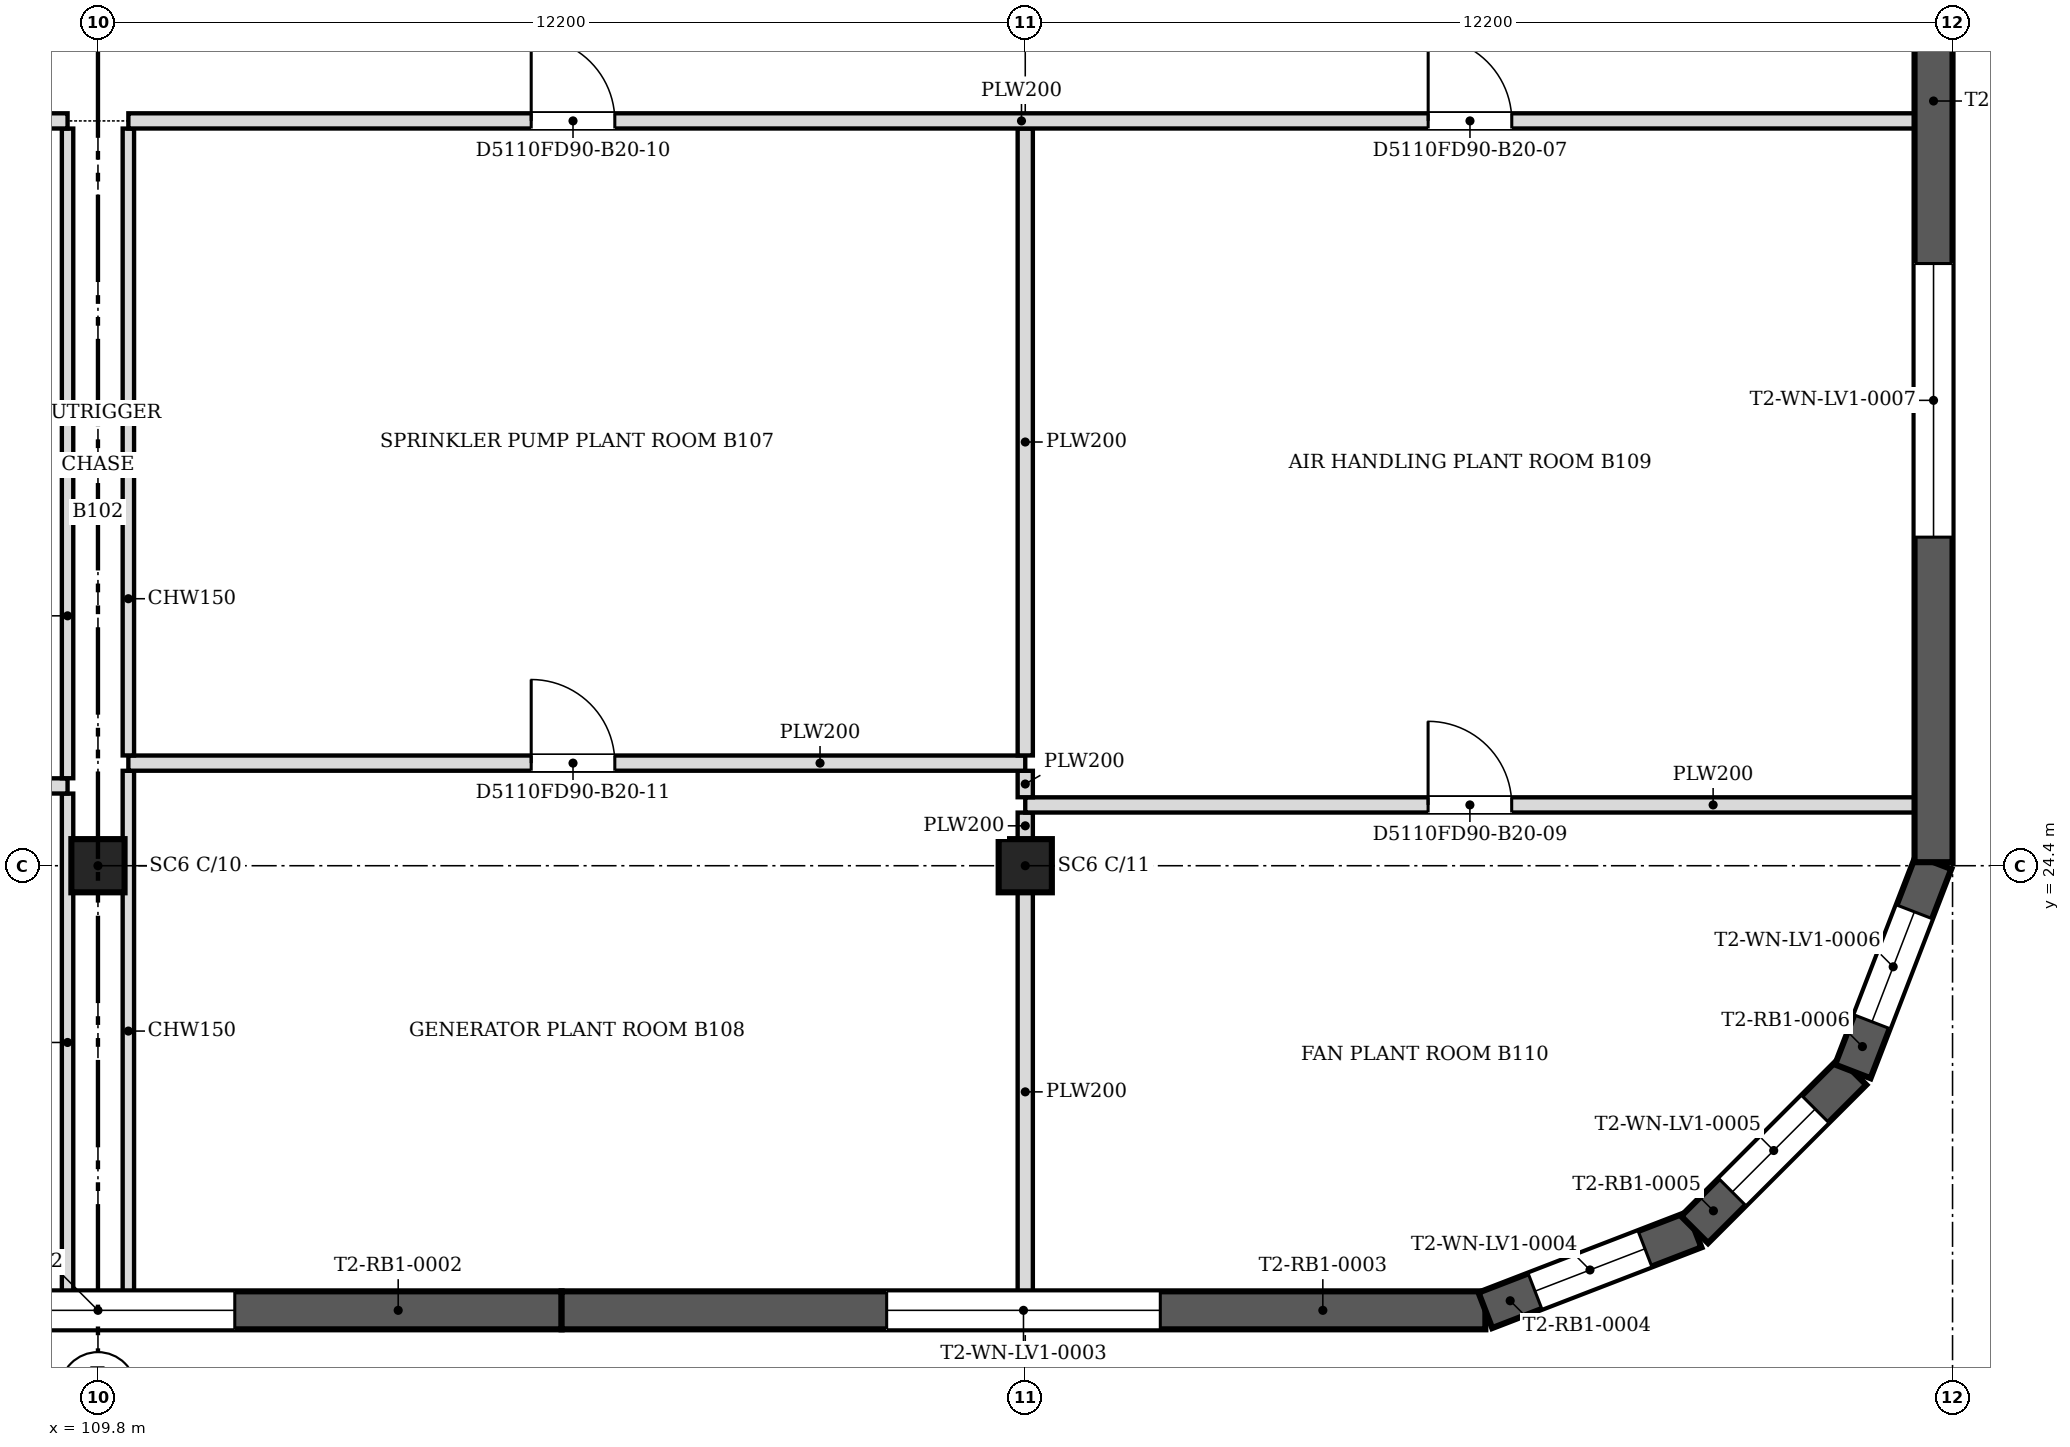
"""IFC4 building model, lengths in metres.
Left out: names, types, materials, properties, quantities, classifications, styles, units other than length and angle.
Written with IfcOpenShell. Run it as: python <this file> out.ifc"""

import sys

from ifc_helpers import new_model, si_unit, direction, frame, frame_2d, origin, origin_2d, place, context, subcontext, project, spatial, polyline, rectangle, outline, extrude, faceted_brep, source, transform, mapped, element, fill, save


model = new_model("IFC4")
c1 = context("Model", 3, precision=1e-05, world=origin(), true_north=direction((0.0, 1.0)))
c2 = subcontext(c1, "Body", "Model", "MODEL_VIEW")
j1 = project(units=[si_unit("LENGTHUNIT", "METRE"), si_unit("PLANEANGLEUNIT", "RADIAN")], contexts=[c1])
p1 = place(None, origin())
s1 = spatial("IfcSite", under=j1, at=p1, CompositionType="ELEMENT")
p2 = place(p1, origin())
s2 = spatial("IfcBuilding", under=s1, at=p2, CompositionType="ELEMENT")
p3 = place(p2, frame((0.0, 0.0, 63.8)))
s3 = spatial("IfcBuildingStorey", under=s2, at=p3, CompositionType="ELEMENT", Elevation=63.8)
for number, where, z_axis, x_axis in (
    (1, (109.8, 24.4, 0.0), (0.0, 0.0, 1.0), (1.0, 0.0, 0.0)),
    (2, (122.0, 24.4, 0.0), (0.0, 0.0, 1.0), (1.0, 0.0, 0.0)),
):
    element("IfcColumn", number, at=place(p3, frame(where, z_axis=z_axis, x_axis=x_axis)), inside=s3, PredefinedType="COLUMN", context=c2, shape_type="SweptSolid", body=[
        extrude(rectangle(XDim=0.7, YDim=0.7, at=origin_2d()), origin(), (0.0, 0.0, 1.0), 4.6),
    ])
m1 = source(origin(), c2, "Body", "SweptSolid", [
    extrude(outline(polyline([(0.0, 0.0), (12.2, 0.0), (12.2, 4.8), (0.0, 4.8), (0.0, 0.0)])), frame((0.0, 0.25, 0.0), z_axis=(0.0, -1.0, 0.0), x_axis=(1.0, 0.0, 0.0)), (0.0, 0.0, 1.0), 0.5),
])
p4 = place(p3, frame((103.7, 18.55, 0.0), z_axis=(0.0, 0.0, 1.0), x_axis=(1.0, 0.0, 0.0)))
e3 = element("IfcWall", 3, at=p4, inside=s3, PredefinedType="SOLIDWALL", context=c2, shape_type="MappedRepresentation", body=[
    mapped(m1, transform((0.0, 0.0, 0.0), scale=1.0)),
])
m2 = source(origin(), c2, "Body", "SweptSolid", [
    extrude(outline(polyline([(4.3, 0.8), (7.9, 0.8), (7.9, 4.0), (4.3, 4.0), (4.3, 0.8)])), frame((0.0, 0.26, 0.0), z_axis=(0.0, -1.0, 0.0), x_axis=(1.0, 0.0, 0.0)), (0.0, 0.0, 1.0), 0.52),
])
p5 = place(p4, origin())
e4 = element("IfcOpeningElement", 4, at=p5, cuts=e3, PredefinedType="OPENING", context=c2, shape_type="MappedRepresentation", body=[
    mapped(m2, transform((0.0, 0.0, 0.0), scale=1.0)),
])
m3 = source(origin(), c2, "Body", "Brep", [
    faceted_brep([(0.0, -0.25, 0.0), (12.154, -0.25, 0.0), (12.154, -0.25, 4.8), (0.0, -0.25, 4.8), (0.0, 0.25, 4.8), (12.107, 0.25, 4.8), (12.107, 0.25, 0.0), (0.0, 0.25, 0.0), (12.154, -0.0, 0.0), (12.154, -0.0, 4.8)], [[[0, 1, 2, 3]], [[4, 5, 6, 7]], [[7, 6, 8, 1, 0]], [[9, 2, 1, 8]], [[5, 4, 3, 2, 9]], [[4, 7, 0, 3]], [[8, 6, 5, 9]]]),
])
p6 = place(p3, frame((115.9, 18.55, 0.0), z_axis=(0.0, 0.0, 1.0), x_axis=(1.0, 0.0, 0.0)))
e5 = element("IfcWall", 5, at=p6, inside=s3, PredefinedType="SOLIDWALL", context=c2, shape_type="MappedRepresentation", body=[
    mapped(m3, transform((0.0, 0.0, 0.0), scale=1.0)),
])
m4 = source(origin(), c2, "Body", "SweptSolid", [
    extrude(outline(polyline([(4.277, 0.8), (7.877, 0.8), (7.877, 4.0), (4.277, 4.0), (4.277, 0.8)])), frame((0.0, 0.26, 0.0), z_axis=(0.0, -1.0, 0.0), x_axis=(1.0, 0.0, 0.0)), (0.0, 0.0, 1.0), 0.52),
])
p7 = place(p6, origin())
e6 = element("IfcOpeningElement", 6, at=p7, cuts=e5, PredefinedType="OPENING", context=c2, shape_type="MappedRepresentation", body=[
    mapped(m4, transform((0.0, 0.0, 0.0), scale=1.0)),
])
m5 = source(origin(), c2, "Body", "Brep", [
    faceted_brep([(0.0, -0.25, 0.0), (2.95, -0.25, 0.0), (2.95, -0.25, 4.8), (0.0, -0.25, 4.8), (0.047, 0.25, 4.8), (2.898, 0.25, 4.8), (2.898, 0.25, 0.0), (0.047, 0.25, 0.0), (2.95, 0.0, 0.0), (0.0, 0.0, 0.0), (2.95, 0.0, 4.8), (0.0, 0.0, 4.8)], [[[0, 1, 2, 3]], [[4, 5, 6, 7]], [[7, 6, 8, 1, 0, 9]], [[10, 2, 1, 8]], [[5, 4, 11, 3, 2, 10]], [[9, 0, 3, 11]], [[7, 9, 11, 4]], [[8, 6, 5, 10]]]),
])
p8 = place(p3, frame((128.053, 18.55, 0.0), z_axis=(0.0, 0.0, 1.0), x_axis=(0.932999673775, 0.359877213415, 0.0)))
e7 = element("IfcWall", 7, at=p8, inside=s3, PredefinedType="SOLIDWALL", context=c2, shape_type="MappedRepresentation", body=[
    mapped(m5, transform((0.0, 0.0, 0.0), scale=1.0)),
])
m6 = source(origin(), c2, "Body", "SweptSolid", [
    extrude(outline(polyline([(0.7, 0.8), (2.25, 0.8), (2.25, 4.0), (0.7, 4.0), (0.7, 0.8)])), frame((0.0, 0.26, 0.0), z_axis=(0.0, -1.0, 0.0), x_axis=(1.0, 0.0, 0.0)), (0.0, 0.0, 1.0), 0.52),
])
p9 = place(p8, origin())
e8 = element("IfcOpeningElement", 8, at=p9, cuts=e7, PredefinedType="OPENING", context=c2, shape_type="MappedRepresentation", body=[
    mapped(m6, transform((0.0, 0.0, 0.0), scale=1.0)),
])
m7 = source(origin(), c2, "Body", "Brep", [
    faceted_brep([(0.0, -0.25, 0.0), (2.944, -0.25, 0.0), (2.944, -0.25, 4.8), (0.0, -0.25, 4.8), (0.053, 0.25, 4.8), (2.891, 0.25, 4.8), (2.891, 0.25, 0.0), (0.053, 0.25, 0.0), (2.944, 0.0, 0.0), (0.0, 0.0, 0.0), (2.944, 0.0, 4.8), (0.0, 0.0, 4.8)], [[[0, 1, 2, 3]], [[4, 5, 6, 7]], [[7, 6, 8, 1, 0, 9]], [[10, 2, 1, 8]], [[5, 4, 11, 3, 2, 10]], [[9, 0, 3, 11]], [[7, 9, 11, 4]], [[8, 6, 5, 10]]]),
])
p10 = place(p3, frame((130.806, 19.612, 0.0), z_axis=(0.0, 0.0, 1.0), x_axis=(0.707106781187, 0.707106781187, 0.0)))
e9 = element("IfcWall", 9, at=p10, inside=s3, PredefinedType="SOLIDWALL", context=c2, shape_type="MappedRepresentation", body=[
    mapped(m7, transform((0.0, 0.0, 0.0), scale=1.0)),
])
m8 = source(origin(), c2, "Body", "SweptSolid", [
    extrude(outline(polyline([(0.7, 0.8), (2.244, 0.8), (2.244, 4.0), (0.7, 4.0), (0.7, 0.8)])), frame((0.0, 0.26, 0.0), z_axis=(0.0, -1.0, 0.0), x_axis=(1.0, 0.0, 0.0)), (0.0, 0.0, 1.0), 0.52),
])
p11 = place(p10, origin())
e10 = element("IfcOpeningElement", 10, at=p11, cuts=e9, PredefinedType="OPENING", context=c2, shape_type="MappedRepresentation", body=[
    mapped(m8, transform((0.0, 0.0, 0.0), scale=1.0)),
])
m9 = source(origin(), c2, "Body", "Brep", [
    faceted_brep([(0.0, -0.25, 0.0), (2.95, -0.25, 0.0), (2.95, -0.25, 4.8), (0.0, -0.25, 4.8), (0.053, 0.25, 4.8), (2.904, 0.25, 4.8), (2.904, 0.25, 0.0), (0.053, 0.25, 0.0), (2.95, 0.0, 0.0), (0.0, 0.0, 0.0), (2.95, 0.0, 4.8), (0.0, 0.0, 4.8)], [[[0, 1, 2, 3]], [[4, 5, 6, 7]], [[7, 6, 8, 1, 0, 9]], [[10, 2, 1, 8]], [[5, 4, 11, 3, 2, 10]], [[9, 0, 3, 11]], [[7, 9, 11, 4]], [[8, 6, 5, 10]]]),
])
p12 = place(p3, frame((132.888, 21.694, 0.0), z_axis=(0.0, 0.0, 1.0), x_axis=(0.359877213415, 0.932999673775, 0.0)))
e11 = element("IfcWall", 11, at=p12, inside=s3, PredefinedType="SOLIDWALL", context=c2, shape_type="MappedRepresentation", body=[
    mapped(m9, transform((0.0, 0.0, 0.0), scale=1.0)),
])
p13 = place(p12, origin())
e12 = element("IfcOpeningElement", 12, at=p13, cuts=e11, PredefinedType="OPENING", context=c2, shape_type="MappedRepresentation", body=[
    mapped(m6, transform((0.0, 0.0, 0.0), scale=1.0)),
])
m10 = source(origin(), c2, "Body", "Brep", [
    faceted_brep([(0.0, -0.25, 0.0), (12.154, -0.25, 0.0), (12.154, -0.25, 4.8), (0.0, -0.25, 4.8), (0.047, 0.25, 4.8), (12.154, 0.25, 4.8), (12.154, 0.25, 0.0), (0.047, 0.25, 0.0), (0.0, 0.0, 0.0), (0.0, 0.0, 4.8)], [[[0, 1, 2, 3]], [[4, 5, 6, 7]], [[7, 6, 1, 0, 8]], [[5, 4, 9, 3, 2]], [[8, 0, 3, 9]], [[7, 8, 9, 4]], [[1, 6, 5, 2]]]),
])
p14 = place(p3, frame((133.95, 24.447, 0.0), z_axis=(0.0, 0.0, 1.0), x_axis=(0.0, 1.0, 0.0)))
e13 = element("IfcWall", 13, at=p14, inside=s3, PredefinedType="SOLIDWALL", context=c2, shape_type="MappedRepresentation", body=[
    mapped(m10, transform((0.0, 0.0, 0.0), scale=1.0)),
])
p15 = place(p14, origin())
e14 = element("IfcOpeningElement", 14, at=p15, cuts=e13, PredefinedType="OPENING", context=c2, shape_type="MappedRepresentation", body=[
    mapped(m4, transform((0.0, 0.0, 0.0), scale=1.0)),
])
p16 = place(p3, frame((109.4, 18.8, 0.0), z_axis=(0.0, 0.0, 1.0), x_axis=(0.0, 1.0, 0.0)))
e15 = element("IfcWall", 15, at=p16, inside=s3, PredefinedType="PARTITIONING", context=c2, shape_type="SweptSolid", body=[
    extrude(rectangle(XDim=6.549, YDim=0.15, at=frame_2d((3.274, 0.0))), origin(), (0.0, 0.0, 1.0), 4.067),
])
p17 = place(p3, frame((110.2, 18.8, 0.0), z_axis=(0.0, 0.0, 1.0), x_axis=(0.0, 1.0, 0.0)))
e16 = element("IfcWall", 16, at=p17, inside=s3, PredefinedType="PARTITIONING", context=c2, shape_type="SweptSolid", body=[
    extrude(rectangle(XDim=6.849, YDim=0.15, at=frame_2d((3.424, 0.0))), origin(), (0.0, 0.0, 1.0), 4.067),
])
p18 = place(p3, frame((122.0, 18.8, 0.0), z_axis=(0.0, 0.0, 1.0), x_axis=(0.0, 1.0, 0.0)))
e17 = element("IfcWall", 17, at=p18, inside=s3, PredefinedType="PARTITIONING", context=c2, shape_type="SweptSolid", body=[
    extrude(rectangle(XDim=5.249, YDim=0.2, at=frame_2d((2.625, 0.0))), origin(), (0.0, 0.0, 1.0), 4.067),
])
p19 = place(p3, frame((122.0, 24.751, 0.0), z_axis=(0.0, 0.0, 1.0), x_axis=(0.0, 1.0, 0.0)))
e18 = element("IfcWall", 18, at=p19, inside=s3, PredefinedType="PARTITIONING", context=c2, shape_type="SweptSolid", body=[
    extrude(rectangle(XDim=0.348, YDim=0.2, at=frame_2d((0.174, 0.0))), origin(), (0.0, 0.0, 1.0), 4.067),
])
p20 = place(p3, frame((133.7, 25.2, 0.0), z_axis=(0.0, 0.0, 1.0), x_axis=(-1.0, 0.0, 0.0)))
e19 = element("IfcWall", 19, at=p20, inside=s3, PredefinedType="PARTITIONING", context=c2, shape_type="SweptSolid", body=[
    extrude(rectangle(XDim=11.7, YDim=0.2, at=frame_2d((5.85, 0.0))), origin(), (0.0, 0.0, 1.0), 4.067),
])
m11 = source(origin(), c2, "Body", "SweptSolid", [
    extrude(rectangle(XDim=1.1, YDim=2.1, at=frame_2d((0.55, 1.05))), frame((0.0, 0.11, 0.0), z_axis=(0.0, -1.0, 0.0), x_axis=(1.0, 0.0, 0.0)), (0.0, 0.0, 1.0), 0.22),
])
p21 = place(p20, frame((5.3, 0.0, 0.0)))
e20 = element("IfcOpeningElement", 20, at=p21, cuts=e19, PredefinedType="OPENING", context=c2, shape_type="MappedRepresentation", body=[
    mapped(m11, transform((0.0, 0.0, 0.0), scale=1.0)),
])
p22 = place(p3, frame((122.0, 25.301, 0.0), z_axis=(0.0, 0.0, 1.0), x_axis=(0.0, 1.0, 0.0)))
e21 = element("IfcWall", 21, at=p22, inside=s3, PredefinedType="PARTITIONING", context=c2, shape_type="SweptSolid", body=[
    extrude(rectangle(XDim=0.348, YDim=0.2, at=frame_2d((0.174, 0.0))), origin(), (0.0, 0.0, 1.0), 4.067),
])
p23 = place(p3, frame((109.4, 25.45, 0.0), z_axis=(0.0, 0.0, 1.0), x_axis=(-1.0, 0.0, 0.0)))
e22 = element("IfcWall", 22, at=p23, inside=s3, PredefinedType="PARTITIONING", context=c2, shape_type="SweptSolid", body=[
    extrude(rectangle(XDim=11.8, YDim=0.2, at=frame_2d((5.9, 0.0))), origin(), (0.0, 0.0, 1.0), 4.067),
])
p24 = place(p23, frame((5.4, 0.0, 0.0)))
e23 = element("IfcOpeningElement", 23, at=p24, cuts=e22, PredefinedType="OPENING", context=c2, shape_type="MappedRepresentation", body=[
    mapped(m11, transform((0.0, 0.0, 0.0), scale=1.0)),
])
p25 = place(p3, frame((109.4, 25.551, 0.0), z_axis=(0.0, 0.0, 1.0), x_axis=(0.0, 1.0, 0.0)))
e24 = element("IfcWall", 24, at=p25, inside=s3, PredefinedType="PARTITIONING", context=c2, shape_type="SweptSolid", body=[
    extrude(rectangle(XDim=8.548, YDim=0.15, at=frame_2d((4.274, 0.0))), origin(), (0.0, 0.0, 1.0), 4.067),
])
p26 = place(p3, frame((122.0, 25.75, 0.0), z_axis=(0.0, 0.0, 1.0), x_axis=(-1.0, 0.0, 0.0)))
e25 = element("IfcWall", 25, at=p26, inside=s3, PredefinedType="PARTITIONING", context=c2, shape_type="SweptSolid", body=[
    extrude(rectangle(XDim=11.8, YDim=0.2, at=frame_2d((5.9, 0.0))), origin(), (0.0, 0.0, 1.0), 4.067),
])
p27 = place(p26, frame((5.4, 0.0, 0.0)))
e26 = element("IfcOpeningElement", 26, at=p27, cuts=e25, PredefinedType="OPENING", context=c2, shape_type="MappedRepresentation", body=[
    mapped(m11, transform((0.0, 0.0, 0.0), scale=1.0)),
])
p28 = place(p3, frame((110.2, 25.851, 0.0), z_axis=(0.0, 0.0, 1.0), x_axis=(0.0, 1.0, 0.0)))
e27 = element("IfcWall", 27, at=p28, inside=s3, PredefinedType="PARTITIONING", context=c2, shape_type="SweptSolid", body=[
    extrude(rectangle(XDim=8.248, YDim=0.15, at=frame_2d((4.124, 0.0))), origin(), (0.0, 0.0, 1.0), 4.067),
])
p29 = place(p3, frame((122.0, 25.851, 0.0), z_axis=(0.0, 0.0, 1.0), x_axis=(0.0, 1.0, 0.0)))
e28 = element("IfcWall", 28, at=p29, inside=s3, PredefinedType="PARTITIONING", context=c2, shape_type="SweptSolid", body=[
    extrude(rectangle(XDim=8.248, YDim=0.2, at=frame_2d((4.124, 0.0))), origin(), (0.0, 0.0, 1.0), 4.067),
])
p30 = place(p3, frame((109.4, 34.2, 0.0), z_axis=(0.0, 0.0, 1.0), x_axis=(-1.0, 0.0, 0.0)))
e29 = element("IfcWall", 29, at=p30, inside=s3, PredefinedType="PARTITIONING", context=c2, shape_type="SweptSolid", body=[
    extrude(rectangle(XDim=23.5, YDim=0.2, at=frame_2d((11.75, 0.0))), origin(), (0.0, 0.0, 1.0), 4.067),
])
p31 = place(p30, frame((17.1, 0.0, 0.0)))
e30 = element("IfcOpeningElement", 30, at=p31, cuts=e29, PredefinedType="OPENING", context=c2, shape_type="MappedRepresentation", body=[
    mapped(m11, transform((0.0, 0.0, 0.0), scale=1.0)),
])
p32 = place(p30, frame((5.4, 0.0, 0.0)))
e31 = element("IfcOpeningElement", 31, at=p32, cuts=e29, PredefinedType="OPENING", context=c2, shape_type="MappedRepresentation", body=[
    mapped(m11, transform((0.0, 0.0, 0.0), scale=1.0)),
])
p33 = place(p3, frame((133.7, 34.2, 0.0), z_axis=(0.0, 0.0, 1.0), x_axis=(-1.0, 0.0, 0.0)))
e32 = element("IfcWall", 32, at=p33, inside=s3, PredefinedType="PARTITIONING", context=c2, shape_type="SweptSolid", body=[
    extrude(rectangle(XDim=23.5, YDim=0.2, at=frame_2d((11.75, 0.0))), origin(), (0.0, 0.0, 1.0), 4.067),
])
p34 = place(p33, frame((5.299, 0.0, 0.0)))
e33 = element("IfcOpeningElement", 33, at=p34, cuts=e32, PredefinedType="OPENING", context=c2, shape_type="MappedRepresentation", body=[
    mapped(m11, transform((0.0, 0.0, 0.0), scale=1.0)),
])
p35 = place(p33, frame((17.1, 0.0, 0.0)))
e34 = element("IfcOpeningElement", 34, at=p35, cuts=e32, PredefinedType="OPENING", context=c2, shape_type="MappedRepresentation", body=[
    mapped(m11, transform((0.0, 0.0, 0.0), scale=1.0)),
])
m12 = source(origin(), c2, "Body", "SweptSolid", [
    extrude(outline(polyline([(4.3, 0.8), (7.9, 0.8), (7.9, 4.0), (4.3, 4.0), (4.3, 0.8)])), frame((0.0, 0.03, 0.0), z_axis=(0.0, -1.0, 0.0), x_axis=(1.0, 0.0, 0.0)), (0.0, 0.0, 1.0), 0.06),
])
p36 = place(p5, origin())
e35 = element("IfcWindow", 35, at=p36, inside=s3, PartitioningType="USERDEFINED", PredefinedType="WINDOW", context=c2, shape_type="MappedRepresentation", body=[
    mapped(m12, transform((0.0, 0.0, 0.0), scale=1.0)),
])
fill(e4, e35)
m13 = source(origin(), c2, "Body", "SweptSolid", [
    extrude(outline(polyline([(4.277, 0.8), (7.877, 0.8), (7.877, 4.0), (4.277, 4.0), (4.277, 0.8)])), frame((0.0, 0.03, 0.0), z_axis=(0.0, -1.0, 0.0), x_axis=(1.0, 0.0, 0.0)), (0.0, 0.0, 1.0), 0.06),
])
p37 = place(p7, origin())
e36 = element("IfcWindow", 36, at=p37, inside=s3, PartitioningType="USERDEFINED", PredefinedType="WINDOW", context=c2, shape_type="MappedRepresentation", body=[
    mapped(m13, transform((0.0, 0.0, 0.0), scale=1.0)),
])
fill(e6, e36)
m14 = source(origin(), c2, "Body", "SweptSolid", [
    extrude(outline(polyline([(0.7, 0.8), (2.25, 0.8), (2.25, 4.0), (0.7, 4.0), (0.7, 0.8)])), frame((0.0, 0.03, 0.0), z_axis=(0.0, -1.0, 0.0), x_axis=(1.0, 0.0, 0.0)), (0.0, 0.0, 1.0), 0.06),
])
p38 = place(p9, origin())
e37 = element("IfcWindow", 37, at=p38, inside=s3, PartitioningType="USERDEFINED", PredefinedType="WINDOW", context=c2, shape_type="MappedRepresentation", body=[
    mapped(m14, transform((0.0, 0.0, 0.0), scale=1.0)),
])
fill(e8, e37)
m15 = source(origin(), c2, "Body", "SweptSolid", [
    extrude(outline(polyline([(0.7, 0.8), (2.244, 0.8), (2.244, 4.0), (0.7, 4.0), (0.7, 0.8)])), frame((0.0, 0.03, 0.0), z_axis=(0.0, -1.0, 0.0), x_axis=(1.0, 0.0, 0.0)), (0.0, 0.0, 1.0), 0.06),
])
p39 = place(p11, origin())
e38 = element("IfcWindow", 38, at=p39, inside=s3, PartitioningType="USERDEFINED", PredefinedType="WINDOW", context=c2, shape_type="MappedRepresentation", body=[
    mapped(m15, transform((0.0, 0.0, 0.0), scale=1.0)),
])
fill(e10, e38)
p40 = place(p13, origin())
e39 = element("IfcWindow", 39, at=p40, inside=s3, PartitioningType="USERDEFINED", PredefinedType="WINDOW", context=c2, shape_type="MappedRepresentation", body=[
    mapped(m14, transform((0.0, 0.0, 0.0), scale=1.0)),
])
fill(e12, e39)
p41 = place(p15, origin())
e40 = element("IfcWindow", 40, at=p41, inside=s3, PartitioningType="USERDEFINED", PredefinedType="WINDOW", context=c2, shape_type="MappedRepresentation", body=[
    mapped(m13, transform((0.0, 0.0, 0.0), scale=1.0)),
])
fill(e14, e40)
m16 = source(origin(), c2, "Body", "SweptSolid", [
    extrude(rectangle(XDim=1.1, YDim=2.1, at=frame_2d((0.55, 1.05))), frame((0.0, 0.025, 0.0), z_axis=(0.0, -1.0, 0.0), x_axis=(1.0, 0.0, 0.0)), (0.0, 0.0, 1.0), 0.05),
])
p42 = place(p34, origin())
e41 = element("IfcDoor", 41, at=p42, inside=s3, OperationType="SINGLE_SWING_RIGHT", PredefinedType="DOOR", context=c2, shape_type="MappedRepresentation", body=[
    mapped(m16, transform((0.0, 0.0, 0.0), scale=1.0)),
])
fill(e33, e41)
p43 = place(p21, origin())
e42 = element("IfcDoor", 42, at=p43, inside=s3, OperationType="SINGLE_SWING_RIGHT", PredefinedType="DOOR", context=c2, shape_type="MappedRepresentation", body=[
    mapped(m16, transform((0.0, 0.0, 0.0), scale=1.0)),
])
fill(e20, e42)
p44 = place(p35, origin())
e43 = element("IfcDoor", 43, at=p44, inside=s3, OperationType="SINGLE_SWING_RIGHT", PredefinedType="DOOR", context=c2, shape_type="MappedRepresentation", body=[
    mapped(m16, transform((0.0, 0.0, 0.0), scale=1.0)),
])
fill(e34, e43)
p45 = place(p27, origin())
e44 = element("IfcDoor", 44, at=p45, inside=s3, OperationType="SINGLE_SWING_RIGHT", PredefinedType="DOOR", context=c2, shape_type="MappedRepresentation", body=[
    mapped(m16, transform((0.0, 0.0, 0.0), scale=1.0)),
])
fill(e26, e44)
save(model, sys.argv[1])
